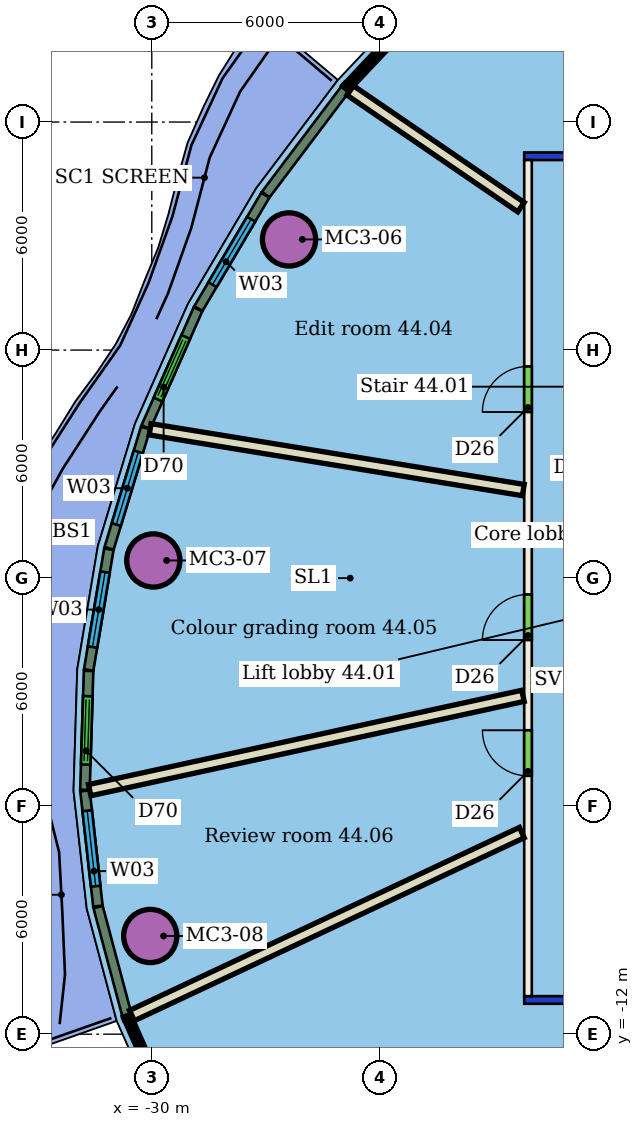
"""IFC4 building model, lengths in metres.
Left out: names, types, materials, properties, quantities, classifications, styles, units other than length and angle.
Written with IfcOpenShell. Run it as: python <this file> out.ifc"""

import sys

from ifc_helpers import new_model, si_unit, direction, frame, frame_2d, origin, origin_2d, place, context, subcontext, project, spatial, rectangle, hollow_circle, extrude, element, fill, save


model = new_model("IFC4")
c1 = context("Model", 3, precision=1e-05, world=origin(), true_north=direction((0.0, 1.0)))
c2 = subcontext(c1, "Body", "Model", "MODEL_VIEW")
j1 = project(units=[si_unit("LENGTHUNIT", "METRE"), si_unit("PLANEANGLEUNIT", "RADIAN")], contexts=[c1])
p1 = place(None, origin())
s1 = spatial("IfcSite", under=j1, at=p1, CompositionType="ELEMENT")
p2 = place(p1, origin())
s2 = spatial("IfcBuilding", under=s1, at=p2, CompositionType="ELEMENT")
p3 = place(p2, frame((0.0, 0.0, 183.0)))
s3 = spatial("IfcBuildingStorey", under=s2, at=p3, CompositionType="ELEMENT", Elevation=183.0)
for number, where, z_axis, x_axis in (
    (1, (-26.388, 8.912, 0.0), (0.0, 0.0, 1.0), (1.0, 0.0, 0.0)),
    (2, (-29.959, 0.464, 0.0), (0.0, 0.0, 1.0), (1.0, 0.0, 0.0)),
    (3, (-30.041, -9.417, 0.0), (0.0, 0.0, 1.0), (1.0, 0.0, 0.0)),
):
    element("IfcColumn", number, at=place(p3, frame(where, z_axis=z_axis, x_axis=x_axis)), inside=s3, PredefinedType="COLUMN", context=c2, shape_type="SweptSolid", body=[
        extrude(hollow_circle(Radius=0.7, WallThickness=0.05, at=origin_2d()), origin(), (0.0, 0.0, 1.0), 3.45),
    ])
p4 = place(p3, frame((8.2, -11.1, 0.0), z_axis=(0.0, 0.0, 1.0), x_axis=(-1.0, 0.0, 0.0)))
e4 = element("IfcWall", 4, at=p4, inside=s3, PredefinedType="PARTITIONING", context=c2, shape_type="SweptSolid", body=[
    extrude(rectangle(XDim=28.4, YDim=0.2, at=frame_2d((14.2, 0.0))), origin(), (0.0, 0.0, 1.0), 3.05),
])
p5 = place(p4, frame((22.184, 0.0, 0.0)))
e5 = element("IfcOpeningElement", 5, at=p5, cuts=e4, PredefinedType="OPENING", context=c2, shape_type="SweptSolid", body=[
    extrude(rectangle(XDim=1.8, YDim=2.1, at=frame_2d((0.9, 1.05))), frame((0.0, 0.11, 0.0), z_axis=(0.0, -1.0, 0.0), x_axis=(1.0, 0.0, 0.0)), (0.0, 0.0, 1.0), 0.22),
])
p6 = place(p4, frame((15.038, 0.0, 0.0)))
e6 = element("IfcOpeningElement", 6, at=p6, cuts=e4, PredefinedType="OPENING", context=c2, shape_type="SweptSolid", body=[
    extrude(rectangle(XDim=1.8, YDim=2.1, at=frame_2d((0.9, 1.05))), frame((0.0, 0.11, 0.0), z_axis=(0.0, -1.0, 0.0), x_axis=(1.0, 0.0, 0.0)), (0.0, 0.0, 1.0), 0.22),
])
p7 = place(p4, frame((4.866, 0.0, 0.0)))
e7 = element("IfcOpeningElement", 7, at=p7, cuts=e4, PredefinedType="OPENING", context=c2, shape_type="SweptSolid", body=[
    extrude(rectangle(XDim=1.0, YDim=2.1, at=frame_2d((0.5, 1.05))), frame((0.0, 0.11, 0.0), z_axis=(0.0, -1.0, 0.0), x_axis=(1.0, 0.0, 0.0)), (0.0, 0.0, 1.0), 0.22),
])
p8 = place(p3, frame((-20.1, -11.0, 0.0), z_axis=(0.0, 0.0, 1.0), x_axis=(0.0, 1.0, 0.0)))
e8 = element("IfcWall", 8, at=p8, inside=s3, PredefinedType="PARTITIONING", context=c2, shape_type="SweptSolid", body=[
    extrude(rectangle(XDim=22.0, YDim=0.2, at=frame_2d((11.0, 0.0))), origin(), (0.0, 0.0, 1.0), 3.45),
])
p9 = place(p8, frame((15.37, 0.0, 0.0)))
e9 = element("IfcOpeningElement", 9, at=p9, cuts=e8, PredefinedType="OPENING", context=c2, shape_type="SweptSolid", body=[
    extrude(rectangle(XDim=1.2, YDim=2.1, at=frame_2d((0.6, 1.05))), frame((0.0, 0.11, 0.0), z_axis=(0.0, -1.0, 0.0), x_axis=(1.0, 0.0, 0.0)), (0.0, 0.0, 1.0), 0.22),
])
p10 = place(p8, frame((9.37, 0.0, 0.0)))
e10 = element("IfcOpeningElement", 10, at=p10, cuts=e8, PredefinedType="OPENING", context=c2, shape_type="SweptSolid", body=[
    extrude(rectangle(XDim=1.2, YDim=2.1, at=frame_2d((0.6, 1.05))), frame((0.0, 0.11, 0.0), z_axis=(0.0, -1.0, 0.0), x_axis=(1.0, 0.0, 0.0)), (0.0, 0.0, 1.0), 0.22),
])
p11 = place(p8, frame((5.797, 0.0, 0.0)))
e11 = element("IfcOpeningElement", 11, at=p11, cuts=e8, PredefinedType="OPENING", context=c2, shape_type="SweptSolid", body=[
    extrude(rectangle(XDim=1.2, YDim=2.1, at=frame_2d((0.6, 1.05))), frame((0.0, 0.11, 0.0), z_axis=(0.0, -1.0, 0.0), x_axis=(1.0, 0.0, 0.0)), (0.0, 0.0, 1.0), 0.22),
])
p12 = place(p3, frame((-20.2, 11.1, 0.0), z_axis=(0.0, 0.0, 1.0), x_axis=(1.0, 0.0, 0.0)))
e12 = element("IfcWall", 12, at=p12, inside=s3, PredefinedType="PARTITIONING", context=c2, shape_type="SweptSolid", body=[
    extrude(rectangle(XDim=28.4, YDim=0.2, at=frame_2d((14.2, 0.0))), origin(), (0.0, 0.0, 1.0), 3.05),
])
p13 = place(p12, frame((19.288, 0.0, 0.0)))
e13 = element("IfcOpeningElement", 13, at=p13, cuts=e12, PredefinedType="OPENING", context=c2, shape_type="SweptSolid", body=[
    extrude(rectangle(XDim=1.8, YDim=2.1, at=frame_2d((0.9, 1.05))), frame((0.0, 0.11, 0.0), z_axis=(0.0, -1.0, 0.0), x_axis=(1.0, 0.0, 0.0)), (0.0, 0.0, 1.0), 0.22),
])
p14 = place(p12, frame((9.583, 0.0, 0.0)))
e14 = element("IfcOpeningElement", 14, at=p14, cuts=e12, PredefinedType="OPENING", context=c2, shape_type="SweptSolid", body=[
    extrude(rectangle(XDim=1.5, YDim=2.1, at=frame_2d((0.75, 1.05))), frame((0.0, 0.11, 0.0), z_axis=(0.0, -1.0, 0.0), x_axis=(1.0, 0.0, 0.0)), (0.0, 0.0, 1.0), 0.22),
])
p15 = place(p12, frame((4.896, 0.0, 0.0)))
e15 = element("IfcOpeningElement", 15, at=p15, cuts=e12, PredefinedType="OPENING", context=c2, shape_type="SweptSolid", body=[
    extrude(rectangle(XDim=0.9, YDim=2.1, at=frame_2d((0.45, 1.05))), frame((0.0, 0.11, 0.0), z_axis=(0.0, -1.0, 0.0), x_axis=(1.0, 0.0, 0.0)), (0.0, 0.0, 1.0), 0.22),
])
p16 = place(p12, frame((24.821, 0.0, 0.0)))
e16 = element("IfcOpeningElement", 16, at=p16, cuts=e12, PredefinedType="OPENING", context=c2, shape_type="SweptSolid", body=[
    extrude(rectangle(XDim=1.5, YDim=2.1, at=frame_2d((0.75, 1.05))), frame((0.0, 0.11, 0.0), z_axis=(0.0, -1.0, 0.0), x_axis=(1.0, 0.0, 0.0)), (0.0, 0.0, 1.0), 0.22),
])
p17 = place(p3, frame((-24.779, 12.832, 0.0), z_axis=(0.0, 0.0, 1.0), x_axis=(0.825654739336, -0.564175727422, 0.0)))
e17 = element("IfcWall", 17, at=p17, inside=s3, PredefinedType="PARTITIONING", context=c2, shape_type="SweptSolid", body=[
    extrude(rectangle(XDim=5.443, YDim=0.3, at=frame_2d((2.722, 0.0))), origin(), (0.0, 0.0, 1.0), 3.45),
])
p18 = place(p3, frame((-30.043, 3.916, 0.0), z_axis=(0.0, 0.0, 1.0), x_axis=(0.986993418954, -0.16076066354, 0.0)))
e18 = element("IfcWall", 18, at=p18, inside=s3, PredefinedType="PARTITIONING", context=c2, shape_type="SweptSolid", body=[
    extrude(rectangle(XDim=9.949, YDim=0.3, at=frame_2d((4.974, 0.0))), origin(), (0.0, 0.0, 1.0), 3.45),
])
p19 = place(p3, frame((-31.634, -5.58, 0.0), z_axis=(0.0, 0.0, 1.0), x_axis=(0.977120060492, 0.212688474969, 0.0)))
e19 = element("IfcWall", 19, at=p19, inside=s3, PredefinedType="PARTITIONING", context=c2, shape_type="SweptSolid", body=[
    extrude(rectangle(XDim=11.669, YDim=0.3, at=frame_2d((5.835, 0.0))), origin(), (0.0, 0.0, 1.0), 3.45),
])
p20 = place(p3, frame((-30.522, -11.511, 0.0), z_axis=(0.0, 0.0, 1.0), x_axis=(0.905230348608, 0.424921187938, 0.0)))
e20 = element("IfcWall", 20, at=p20, inside=s3, PredefinedType="PARTITIONING", context=c2, shape_type="SweptSolid", body=[
    extrude(rectangle(XDim=11.333, YDim=0.3, at=frame_2d((5.666, 0.0))), origin(), (0.0, 0.0, 1.0), 3.45),
])
p21 = place(p3, frame((-24.908, 12.869, 0.0), z_axis=(0.0, 0.0, 1.0), x_axis=(-0.602031278038, -0.798472504388, 0.0)))
e21 = element("IfcWall", 21, at=p21, inside=s3, PredefinedType="SOLIDWALL", context=c2, shape_type="SweptSolid", body=[
    extrude(rectangle(XDim=3.477, YDim=0.25, at=frame_2d((1.739, 0.0))), origin(), (0.0, 0.0, 1.0), 3.1),
])
p22 = place(p3, frame((-27.013, 10.074, 0.0), z_axis=(0.0, 0.0, 1.0), x_axis=(-0.508356425064, -0.861146761648, 0.0)))
e22 = element("IfcWall", 22, at=p22, inside=s3, PredefinedType="SOLIDWALL", context=c2, shape_type="SweptSolid", body=[
    extrude(rectangle(XDim=3.464, YDim=0.25, at=frame_2d((1.732, 0.0))), origin(), (0.0, 0.0, 1.0), 3.1),
])
p23 = place(p22, frame((0.732, 0.0, 0.9)))
e23 = element("IfcOpeningElement", 23, at=p23, cuts=e22, PredefinedType="OPENING", context=c2, shape_type="SweptSolid", body=[
    extrude(rectangle(XDim=2.0, YDim=2.1, at=frame_2d((1.0, 1.05))), frame((0.0, 0.135, 0.0), z_axis=(0.0, -1.0, 0.0), x_axis=(1.0, 0.0, 0.0)), (0.0, 0.0, 1.0), 0.27),
])
p24 = place(p3, frame((-28.784, 7.072, 0.0), z_axis=(0.0, 0.0, 1.0), x_axis=(-0.404494434215, -0.914540459843, 0.0)))
e24 = element("IfcWall", 24, at=p24, inside=s3, PredefinedType="SOLIDWALL", context=c2, shape_type="SweptSolid", body=[
    extrude(rectangle(XDim=3.391, YDim=0.25, at=frame_2d((1.695, 0.0))), origin(), (0.0, 0.0, 1.0), 3.1),
])
p25 = place(p24, frame((0.795, 0.0, 0.0)))
e25 = element("IfcOpeningElement", 25, at=p25, cuts=e24, PredefinedType="OPENING", context=c2, shape_type="SweptSolid", body=[
    extrude(rectangle(XDim=1.8, YDim=2.4, at=frame_2d((0.9, 1.2))), frame((0.0, 0.135, 0.0), z_axis=(0.0, -1.0, 0.0), x_axis=(1.0, 0.0, 0.0)), (0.0, 0.0, 1.0), 0.27),
])
p26 = place(p3, frame((-30.164, 3.949, 0.0), z_axis=(0.0, 0.0, 1.0), x_axis=(-0.290048362563, -0.957011989149, 0.0)))
e26 = element("IfcWall", 26, at=p26, inside=s3, PredefinedType="SOLIDWALL", context=c2, shape_type="SweptSolid", body=[
    extrude(rectangle(XDim=3.308, YDim=0.25, at=frame_2d((1.654, 0.0))), origin(), (0.0, 0.0, 1.0), 3.1),
])
p27 = place(p26, frame((0.654, 0.0, 0.9)))
e27 = element("IfcOpeningElement", 27, at=p27, cuts=e26, PredefinedType="OPENING", context=c2, shape_type="SweptSolid", body=[
    extrude(rectangle(XDim=2.0, YDim=2.1, at=frame_2d((1.0, 1.05))), frame((0.0, 0.135, 0.0), z_axis=(0.0, -1.0, 0.0), x_axis=(1.0, 0.0, 0.0)), (0.0, 0.0, 1.0), 0.27),
])
p28 = place(p3, frame((-31.129, 0.76, 0.0), z_axis=(0.0, 0.0, 1.0), x_axis=(-0.165062898456, -0.986283042313, 0.0)))
e28 = element("IfcWall", 28, at=p28, inside=s3, PredefinedType="SOLIDWALL", context=c2, shape_type="SweptSolid", body=[
    extrude(rectangle(XDim=3.22, YDim=0.25, at=frame_2d((1.61, 0.0))), origin(), (0.0, 0.0, 1.0), 3.1),
])
p29 = place(p28, frame((0.61, 0.0, 0.9)))
e29 = element("IfcOpeningElement", 29, at=p29, cuts=e28, PredefinedType="OPENING", context=c2, shape_type="SweptSolid", body=[
    extrude(rectangle(XDim=2.0, YDim=2.1, at=frame_2d((1.0, 1.05))), frame((0.0, 0.135, 0.0), z_axis=(0.0, -1.0, 0.0), x_axis=(1.0, 0.0, 0.0)), (0.0, 0.0, 1.0), 0.27),
])
p30 = place(p3, frame((-31.663, -2.441, 0.0), z_axis=(0.0, 0.0, 1.0), x_axis=(-0.030631283966, -0.999530752125, 0.0)))
e30 = element("IfcWall", 30, at=p30, inside=s3, PredefinedType="SOLIDWALL", context=c2, shape_type="SweptSolid", body=[
    extrude(rectangle(XDim=3.132, YDim=0.25, at=frame_2d((1.566, 0.0))), origin(), (0.0, 0.0, 1.0), 3.1),
])
p31 = place(p30, frame((0.666, 0.0, 0.0)))
e31 = element("IfcOpeningElement", 31, at=p31, cuts=e30, PredefinedType="OPENING", context=c2, shape_type="SweptSolid", body=[
    extrude(rectangle(XDim=1.8, YDim=2.4, at=frame_2d((0.9, 1.2))), frame((0.0, 0.135, 0.0), z_axis=(0.0, -1.0, 0.0), x_axis=(1.0, 0.0, 0.0)), (0.0, 0.0, 1.0), 0.27),
])
p32 = place(p3, frame((-31.758, -5.597, 0.0), z_axis=(0.0, 0.0, 1.0), x_axis=(0.111450096945, -0.993770031693, 0.0)))
e32 = element("IfcWall", 32, at=p32, inside=s3, PredefinedType="SOLIDWALL", context=c2, shape_type="SweptSolid", body=[
    extrude(rectangle(XDim=3.052, YDim=0.25, at=frame_2d((1.526, 0.0))), origin(), (0.0, 0.0, 1.0), 3.1),
])
p33 = place(p32, frame((0.526, 0.0, 0.9)))
e33 = element("IfcOpeningElement", 33, at=p33, cuts=e32, PredefinedType="OPENING", context=c2, shape_type="SweptSolid", body=[
    extrude(rectangle(XDim=2.0, YDim=2.1, at=frame_2d((1.0, 1.05))), frame((0.0, 0.135, 0.0), z_axis=(0.0, -1.0, 0.0), x_axis=(1.0, 0.0, 0.0)), (0.0, 0.0, 1.0), 0.27),
])
p34 = place(p3, frame((-31.413, -8.656, 0.0), z_axis=(0.0, 0.0, 1.0), x_axis=(0.257791752942, -0.966200503061, 0.0)))
e34 = element("IfcWall", 34, at=p34, inside=s3, PredefinedType="SOLIDWALL", context=c2, shape_type="SweptSolid", body=[
    extrude(rectangle(XDim=2.942, YDim=0.25, at=frame_2d((1.471, 0.0))), origin(), (0.0, 0.0, 1.0), 3.1),
])
p35 = place(p9, origin())
e35 = element("IfcDoor", 35, at=p35, inside=s3, OperationType="SINGLE_SWING_LEFT", PredefinedType="DOOR", context=c2, shape_type="SweptSolid", body=[
    extrude(rectangle(XDim=1.2, YDim=2.1, at=frame_2d((0.6, 1.05))), frame((0.0, 0.025, 0.0), z_axis=(0.0, -1.0, 0.0), x_axis=(1.0, 0.0, 0.0)), (0.0, 0.0, 1.0), 0.05),
])
fill(e9, e35)
p36 = place(p10, origin())
e36 = element("IfcDoor", 36, at=p36, inside=s3, OperationType="SINGLE_SWING_LEFT", PredefinedType="DOOR", context=c2, shape_type="SweptSolid", body=[
    extrude(rectangle(XDim=1.2, YDim=2.1, at=frame_2d((0.6, 1.05))), frame((0.0, 0.025, 0.0), z_axis=(0.0, -1.0, 0.0), x_axis=(1.0, 0.0, 0.0)), (0.0, 0.0, 1.0), 0.05),
])
fill(e10, e36)
p37 = place(p11, origin())
e37 = element("IfcDoor", 37, at=p37, inside=s3, OperationType="SINGLE_SWING_RIGHT", PredefinedType="DOOR", context=c2, shape_type="SweptSolid", body=[
    extrude(rectangle(XDim=1.2, YDim=2.1, at=frame_2d((0.6, 1.05))), frame((0.0, 0.025, 0.0), z_axis=(0.0, -1.0, 0.0), x_axis=(1.0, 0.0, 0.0)), (0.0, 0.0, 1.0), 0.05),
])
fill(e11, e37)
p38 = place(p23, origin())
e38 = element("IfcWindow", 38, at=p38, inside=s3, PartitioningType="SINGLE_PANEL", PredefinedType="WINDOW", context=c2, shape_type="SweptSolid", body=[
    extrude(rectangle(XDim=2.0, YDim=2.1, at=frame_2d((1.0, 1.05))), frame((0.0, 0.03, 0.0), z_axis=(0.0, -1.0, 0.0), x_axis=(1.0, 0.0, 0.0)), (0.0, 0.0, 1.0), 0.06),
])
fill(e23, e38)
p39 = place(p25, origin())
e39 = element("IfcDoor", 39, at=p39, inside=s3, OperationType="DOUBLE_DOOR_SLIDING", PredefinedType="DOOR", context=c2, shape_type="SweptSolid", body=[
    extrude(rectangle(XDim=1.8, YDim=2.4, at=frame_2d((0.9, 1.2))), frame((0.0, 0.025, 0.0), z_axis=(0.0, -1.0, 0.0), x_axis=(1.0, 0.0, 0.0)), (0.0, 0.0, 1.0), 0.05),
])
fill(e25, e39)
p40 = place(p27, origin())
e40 = element("IfcWindow", 40, at=p40, inside=s3, PartitioningType="SINGLE_PANEL", PredefinedType="WINDOW", context=c2, shape_type="SweptSolid", body=[
    extrude(rectangle(XDim=2.0, YDim=2.1, at=frame_2d((1.0, 1.05))), frame((0.0, 0.03, 0.0), z_axis=(0.0, -1.0, 0.0), x_axis=(1.0, 0.0, 0.0)), (0.0, 0.0, 1.0), 0.06),
])
fill(e27, e40)
p41 = place(p29, origin())
e41 = element("IfcWindow", 41, at=p41, inside=s3, PartitioningType="SINGLE_PANEL", PredefinedType="WINDOW", context=c2, shape_type="SweptSolid", body=[
    extrude(rectangle(XDim=2.0, YDim=2.1, at=frame_2d((1.0, 1.05))), frame((0.0, 0.03, 0.0), z_axis=(0.0, -1.0, 0.0), x_axis=(1.0, 0.0, 0.0)), (0.0, 0.0, 1.0), 0.06),
])
fill(e29, e41)
p42 = place(p31, origin())
e42 = element("IfcDoor", 42, at=p42, inside=s3, OperationType="DOUBLE_DOOR_SLIDING", PredefinedType="DOOR", context=c2, shape_type="SweptSolid", body=[
    extrude(rectangle(XDim=1.8, YDim=2.4, at=frame_2d((0.9, 1.2))), frame((0.0, 0.025, 0.0), z_axis=(0.0, -1.0, 0.0), x_axis=(1.0, 0.0, 0.0)), (0.0, 0.0, 1.0), 0.05),
])
fill(e31, e42)
p43 = place(p33, origin())
e43 = element("IfcWindow", 43, at=p43, inside=s3, PartitioningType="SINGLE_PANEL", PredefinedType="WINDOW", context=c2, shape_type="SweptSolid", body=[
    extrude(rectangle(XDim=2.0, YDim=2.1, at=frame_2d((1.0, 1.05))), frame((0.0, 0.03, 0.0), z_axis=(0.0, -1.0, 0.0), x_axis=(1.0, 0.0, 0.0)), (0.0, 0.0, 1.0), 0.06),
])
fill(e33, e43)
save(model, sys.argv[1])
